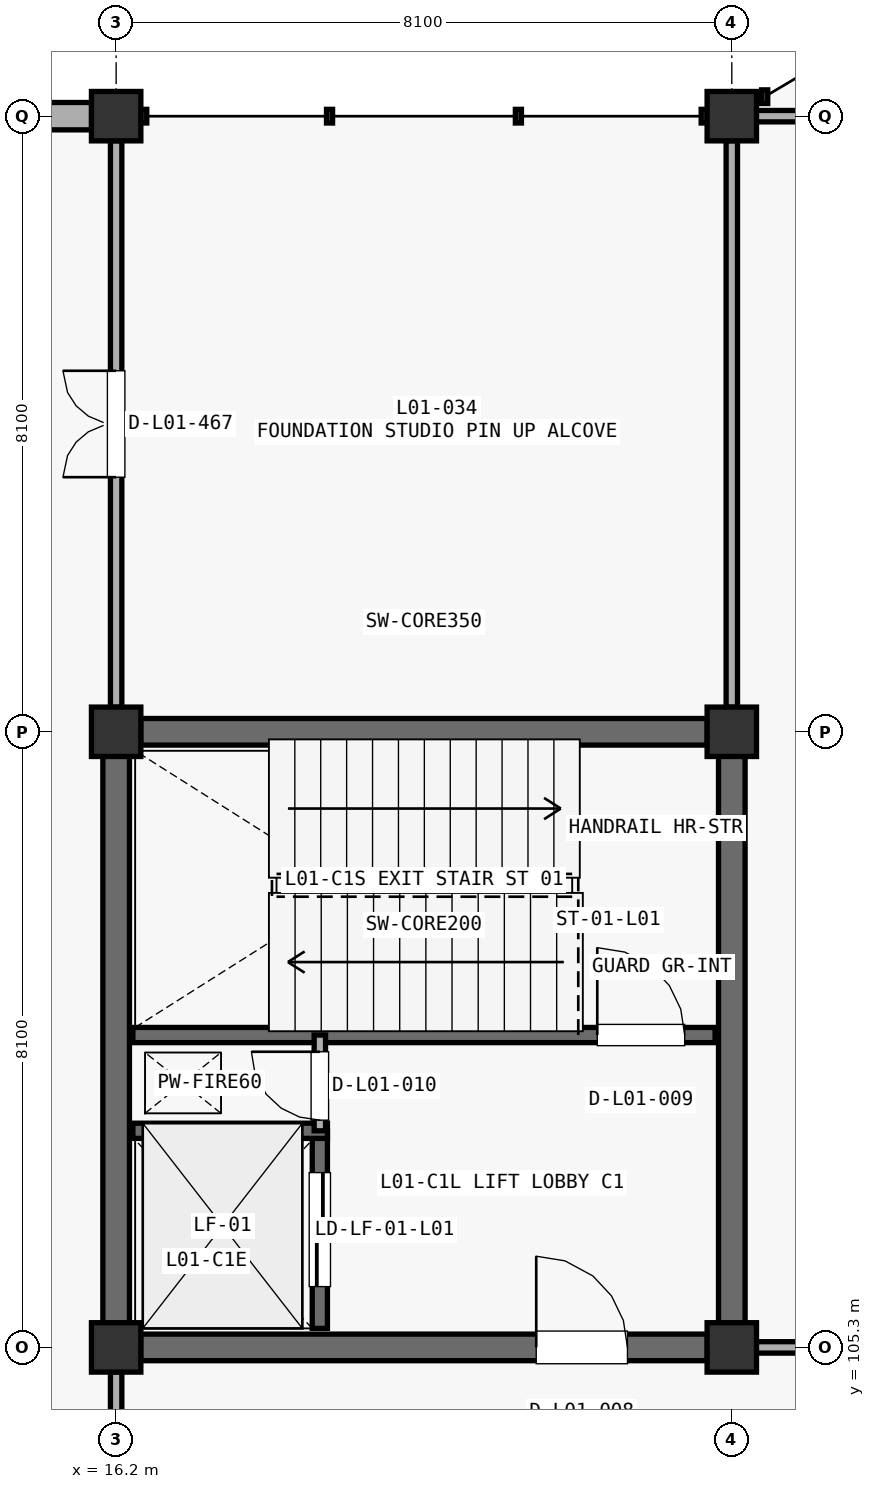
"""IFC4 building model, lengths in metres.
Left out: names, types, materials, properties, quantities, classifications, styles, units other than length and angle.
Written with IfcOpenShell. Run it as: python <this file> out.ifc"""

import sys

from ifc_helpers import new_model, si_unit, direction, frame, frame_2d, origin, origin_2d, place, context, subcontext, project, spatial, rectangle, extrude, element, fill, save


model = new_model("IFC4")
c1 = context("Model", 3, precision=1e-05, world=origin(), true_north=direction((0.0, 1.0)))
c2 = subcontext(c1, "Body", "Model", "MODEL_VIEW")
j1 = project(units=[si_unit("LENGTHUNIT", "METRE"), si_unit("PLANEANGLEUNIT", "RADIAN")], contexts=[c1])
p1 = place(None, origin())
s1 = spatial("IfcSite", under=j1, at=p1, CompositionType="ELEMENT")
p2 = place(p1, origin())
s2 = spatial("IfcBuilding", under=s1, at=p2, CompositionType="ELEMENT")
p3 = place(p2, frame((0.0, 0.0, 5.1)))
s3 = spatial("IfcBuildingStorey", under=s2, at=p3, CompositionType="ELEMENT", Elevation=5.1)
for number, where, z_axis, x_axis in (
    (1, (16.2, 105.3, 0.0), (0.0, 0.0, 1.0), (1.0, 0.0, 0.0)),
    (2, (16.2, 113.4, 0.0), (0.0, 0.0, 1.0), (1.0, 0.0, 0.0)),
    (3, (16.2, 121.5, 0.0), (0.0, 0.0, 1.0), (1.0, 0.0, 0.0)),
    (4, (24.3, 105.3, 0.0), (0.0, 0.0, 1.0), (1.0, 0.0, 0.0)),
    (5, (24.3, 113.4, 0.0), (0.0, 0.0, 1.0), (1.0, 0.0, 0.0)),
    (6, (24.3, 121.5, 0.0), (0.0, 0.0, 1.0), (1.0, 0.0, 0.0)),
):
    element("IfcColumn", number, at=place(p3, frame(where, z_axis=z_axis, x_axis=x_axis)), inside=s3, PredefinedType="COLUMN", context=c2, shape_type="SweptSolid", body=[
        extrude(rectangle(XDim=0.65, YDim=0.65, at=origin_2d()), origin(), (0.0, 0.0, 1.0), 4.59),
    ])
p4 = place(p3, frame((8.423, 121.5, 0.0), z_axis=(0.0, 0.0, 1.0), x_axis=(1.0, 0.0, 0.0)))
e7 = element("IfcWall", 7, at=p4, inside=s3, PredefinedType="STANDARD", context=c2, shape_type="SweptSolid", body=[
    extrude(rectangle(XDim=7.454, YDim=0.36, at=frame_2d((3.727, 0.0))), origin(), (0.0, 0.0, 1.0), 3.402),
])
p5 = place(p4, frame((2.577, 0.0, 0.85)))
e8 = element("IfcOpeningElement", 8, at=p5, cuts=e7, PredefinedType="OPENING", context=c2, shape_type="SweptSolid", body=[
    extrude(rectangle(XDim=2.3, YDim=1.6, at=frame_2d((1.15, 0.8))), frame((0.0, 0.19, 0.0), z_axis=(0.0, -1.0, 0.0), x_axis=(1.0, 0.0, 0.0)), (0.0, 0.0, 1.0), 0.38),
])
p6 = place(p3, frame((16.523, 113.4, 0.0), z_axis=(0.0, 0.0, 1.0), x_axis=(1.0, 0.0, 0.0)))
e9 = element("IfcWall", 9, at=p6, inside=s3, PredefinedType="SHEAR", context=c2, shape_type="SweptSolid", body=[
    extrude(rectangle(XDim=7.454, YDim=0.35, at=frame_2d((3.727, 0.0))), origin(), (0.0, 0.0, 1.0), 4.252),
])
for number, where, z_axis, x_axis in (
    (10, (16.2, 105.623, 0.0), (0.0, 0.0, 1.0), (0.0, 1.0, 0.0)),
    (11, (24.3, 105.623, 0.0), (0.0, 0.0, 1.0), (0.0, 1.0, 0.0)),
):
    element("IfcWall", number, at=place(p3, frame(where, z_axis=z_axis, x_axis=x_axis)), inside=s3, PredefinedType="SHEAR", context=c2, shape_type="SweptSolid", body=[
        extrude(rectangle(XDim=7.454, YDim=0.35, at=frame_2d((3.727, 0.0))), origin(), (0.0, 0.0, 1.0), 4.252),
    ])
p7 = place(p3, frame((16.523, 105.3, 0.0), z_axis=(0.0, 0.0, 1.0), x_axis=(1.0, 0.0, 0.0)))
e12 = element("IfcWall", 12, at=p7, inside=s3, PredefinedType="SHEAR", context=c2, shape_type="SweptSolid", body=[
    extrude(rectangle(XDim=7.454, YDim=0.35, at=frame_2d((3.727, 0.0))), origin(), (0.0, 0.0, 1.0), 4.252),
])
p8 = place(p7, frame((5.204, 0.0, 0.0)))
e13 = element("IfcOpeningElement", 13, at=p8, cuts=e12, PredefinedType="OPENING", context=c2, shape_type="SweptSolid", body=[
    extrude(rectangle(XDim=1.2, YDim=2.2, at=frame_2d((0.6, 1.1))), frame((0.0, 0.185, 0.0), z_axis=(0.0, -1.0, 0.0), x_axis=(1.0, 0.0, 0.0)), (0.0, 0.0, 1.0), 0.37),
])
p9 = place(p3, frame((16.42, 109.41, 0.0), z_axis=(0.0, 0.0, 1.0), x_axis=(1.0, 0.0, 0.0)))
e14 = element("IfcWall", 14, at=p9, inside=s3, PredefinedType="SHEAR", context=c2, shape_type="SweptSolid", body=[
    extrude(rectangle(XDim=7.66, YDim=0.2, at=frame_2d((3.83, 0.0))), origin(), (0.0, 0.0, 1.0), 4.252),
])
p10 = place(p9, frame((6.11, 0.0, 0.0)))
e15 = element("IfcOpeningElement", 15, at=p10, cuts=e14, PredefinedType="OPENING", context=c2, shape_type="SweptSolid", body=[
    extrude(rectangle(XDim=1.15, YDim=2.2, at=frame_2d((0.575, 1.1))), frame((0.0, 0.11, 0.0), z_axis=(0.0, -1.0, 0.0), x_axis=(1.0, 0.0, 0.0)), (0.0, 0.0, 1.0), 0.22),
])
p11 = place(p3, frame((18.88, 105.55, 0.0), z_axis=(0.0, 0.0, 1.0), x_axis=(0.0, 1.0, 0.0)))
e16 = element("IfcWall", 16, at=p11, inside=s3, PredefinedType="SHEAR", context=c2, shape_type="SweptSolid", body=[
    extrude(rectangle(XDim=2.6, YDim=0.2, at=frame_2d((1.3, 0.0))), origin(), (0.0, 0.0, 1.0), 4.252),
])
p12 = place(p11, frame((0.55, 0.0, 0.0)))
e17 = element("IfcOpeningElement", 17, at=p12, cuts=e16, PredefinedType="OPENING", context=c2, shape_type="SweptSolid", body=[
    extrude(rectangle(XDim=1.5, YDim=2.3, at=frame_2d((0.75, 1.15))), frame((0.0, 0.11, 0.0), z_axis=(0.0, -1.0, 0.0), x_axis=(1.0, 0.0, 0.0)), (0.0, 0.0, 1.0), 0.22),
])
p13 = place(p3, frame((16.42, 108.15, 0.0), z_axis=(0.0, 0.0, 1.0), x_axis=(1.0, 0.0, 0.0)))
e18 = element("IfcWall", 18, at=p13, inside=s3, PredefinedType="SHEAR", context=c2, shape_type="SweptSolid", body=[
    extrude(rectangle(XDim=2.56, YDim=0.2, at=frame_2d((1.28, 0.0))), origin(), (0.0, 0.0, 1.0), 4.252),
])
p14 = place(p3, frame((18.88, 108.15, 0.0), z_axis=(0.0, 0.0, 1.0), x_axis=(0.0, 1.0, 0.0)))
e19 = element("IfcWall", 19, at=p14, inside=s3, PredefinedType="PARTITIONING", context=c2, shape_type="SweptSolid", body=[
    extrude(rectangle(XDim=1.26, YDim=0.15, at=frame_2d((0.63, 0.0))), origin(), (0.0, 0.0, 1.0), 4.252),
])
p15 = place(p14, frame((0.14, 0.0, 0.0)))
e20 = element("IfcOpeningElement", 20, at=p15, cuts=e19, PredefinedType="OPENING", context=c2, shape_type="SweptSolid", body=[
    extrude(rectangle(XDim=0.9, YDim=2.15, at=frame_2d((0.45, 1.075))), frame((0.0, 0.085, 0.0), z_axis=(0.0, -1.0, 0.0), x_axis=(1.0, 0.0, 0.0)), (0.0, 0.0, 1.0), 0.17),
])
p16 = place(p3, frame((16.2, 97.523, 0.0), z_axis=(0.0, 0.0, 1.0), x_axis=(0.0, 1.0, 0.0)))
e21 = element("IfcWall", 21, at=p16, inside=s3, PredefinedType="PARTITIONING", context=c2, shape_type="SweptSolid", body=[
    extrude(rectangle(XDim=7.454, YDim=0.15, at=frame_2d((3.727, 0.0))), origin(), (0.0, 0.0, 1.0), 3.402),
])
p17 = place(p16, frame((3.027, 0.0, 0.0)))
e22 = element("IfcOpeningElement", 22, at=p17, cuts=e21, PredefinedType="OPENING", context=c2, shape_type="SweptSolid", body=[
    extrude(rectangle(XDim=1.4, YDim=2.2, at=frame_2d((0.7, 1.1))), frame((0.0, 0.085, 0.0), z_axis=(0.0, -1.0, 0.0), x_axis=(1.0, 0.0, 0.0)), (0.0, 0.0, 1.0), 0.17),
])
p18 = place(p3, frame((16.2, 113.723, 0.0), z_axis=(0.0, 0.0, 1.0), x_axis=(0.0, 1.0, 0.0)))
e23 = element("IfcWall", 23, at=p18, inside=s3, PredefinedType="PARTITIONING", context=c2, shape_type="SweptSolid", body=[
    extrude(rectangle(XDim=7.454, YDim=0.15, at=frame_2d((3.727, 0.0))), origin(), (0.0, 0.0, 1.0), 3.502),
])
p19 = place(p18, frame((3.027, 0.0, 0.0)))
e24 = element("IfcOpeningElement", 24, at=p19, cuts=e23, PredefinedType="OPENING", context=c2, shape_type="SweptSolid", body=[
    extrude(rectangle(XDim=1.4, YDim=2.2, at=frame_2d((0.7, 1.1))), frame((0.0, 0.085, 0.0), z_axis=(0.0, -1.0, 0.0), x_axis=(1.0, 0.0, 0.0)), (0.0, 0.0, 1.0), 0.17),
])
p20 = place(p3, frame((24.623, 105.3, 0.0), z_axis=(0.0, 0.0, 1.0), x_axis=(1.0, 0.0, 0.0)))
e25 = element("IfcWall", 25, at=p20, inside=s3, PredefinedType="PARTITIONING", context=c2, shape_type="SweptSolid", body=[
    extrude(rectangle(XDim=7.454, YDim=0.15, at=frame_2d((3.727, 0.0))), origin(), (0.0, 0.0, 1.0), 3.402),
])
p21 = place(p20, frame((2.907, 0.0, 0.0)))
e26 = element("IfcOpeningElement", 26, at=p21, cuts=e25, PredefinedType="OPENING", context=c2, shape_type="SweptSolid", body=[
    extrude(rectangle(XDim=1.64, YDim=2.25, at=frame_2d((0.82, 1.125))), frame((0.0, 0.085, 0.0), z_axis=(0.0, -1.0, 0.0), x_axis=(1.0, 0.0, 0.0)), (0.0, 0.0, 1.0), 0.17),
])
p22 = place(p3, frame((24.3, 113.723, 0.0), z_axis=(0.0, 0.0, 1.0), x_axis=(0.0, 1.0, 0.0)))
e27 = element("IfcWall", 27, at=p22, inside=s3, PredefinedType="PARTITIONING", context=c2, shape_type="SweptSolid", body=[
    extrude(rectangle(XDim=7.454, YDim=0.15, at=frame_2d((3.727, 0.0))), origin(), (0.0, 0.0, 1.0), 3.652),
])
p23 = place(p3, frame((24.623, 121.5, 0.0), z_axis=(0.0, 0.0, 1.0), x_axis=(1.0, 0.0, 0.0)))
e28 = element("IfcWall", 28, at=p23, inside=s3, PredefinedType="PARTITIONING", context=c2, shape_type="SweptSolid", body=[
    extrude(rectangle(XDim=7.454, YDim=0.15, at=frame_2d((3.727, 0.0))), origin(), (0.0, 0.0, 1.0), 3.837),
])
p24 = place(p8, origin())
e29 = element("IfcDoor", 29, at=p24, inside=s3, OperationType="SINGLE_SWING_LEFT", PredefinedType="DOOR", context=c2, shape_type="SweptSolid", body=[
    extrude(rectangle(XDim=1.2, YDim=2.2, at=frame_2d((0.6, 1.1))), frame((0.0, 0.025, 0.0), z_axis=(0.0, -1.0, 0.0), x_axis=(1.0, 0.0, 0.0)), (0.0, 0.0, 1.0), 0.05),
])
fill(e13, e29)
p25 = place(p10, origin())
e30 = element("IfcDoor", 30, at=p25, inside=s3, OperationType="SINGLE_SWING_LEFT", PredefinedType="DOOR", context=c2, shape_type="SweptSolid", body=[
    extrude(rectangle(XDim=1.15, YDim=2.2, at=frame_2d((0.575, 1.1))), frame((0.0, 0.025, 0.0), z_axis=(0.0, -1.0, 0.0), x_axis=(1.0, 0.0, 0.0)), (0.0, 0.0, 1.0), 0.05),
])
fill(e15, e30)
p26 = place(p12, origin())
e31 = element("IfcDoor", 31, at=p26, inside=s3, OperationType="SLIDING_TO_LEFT", PredefinedType="DOOR", context=c2, shape_type="SweptSolid", body=[
    extrude(rectangle(XDim=1.5, YDim=2.3, at=frame_2d((0.75, 1.15))), frame((0.0, 0.025, 0.0), z_axis=(0.0, -1.0, 0.0), x_axis=(1.0, 0.0, 0.0)), (0.0, 0.0, 1.0), 0.05),
])
fill(e17, e31)
p27 = place(p15, origin())
e32 = element("IfcDoor", 32, at=p27, inside=s3, OperationType="SINGLE_SWING_RIGHT", PredefinedType="DOOR", context=c2, shape_type="SweptSolid", body=[
    extrude(rectangle(XDim=0.9, YDim=2.15, at=frame_2d((0.45, 1.075))), frame((0.0, 0.025, 0.0), z_axis=(0.0, -1.0, 0.0), x_axis=(1.0, 0.0, 0.0)), (0.0, 0.0, 1.0), 0.05),
])
fill(e20, e32)
p28 = place(p19, origin())
e33 = element("IfcDoor", 33, at=p28, inside=s3, OperationType="DOUBLE_SWING_LEFT", PredefinedType="DOOR", context=c2, shape_type="SweptSolid", body=[
    extrude(rectangle(XDim=1.4, YDim=2.2, at=frame_2d((0.7, 1.1))), frame((0.0, 0.025, 0.0), z_axis=(0.0, -1.0, 0.0), x_axis=(1.0, 0.0, 0.0)), (0.0, 0.0, 1.0), 0.05),
])
fill(e24, e33)
save(model, sys.argv[1])
